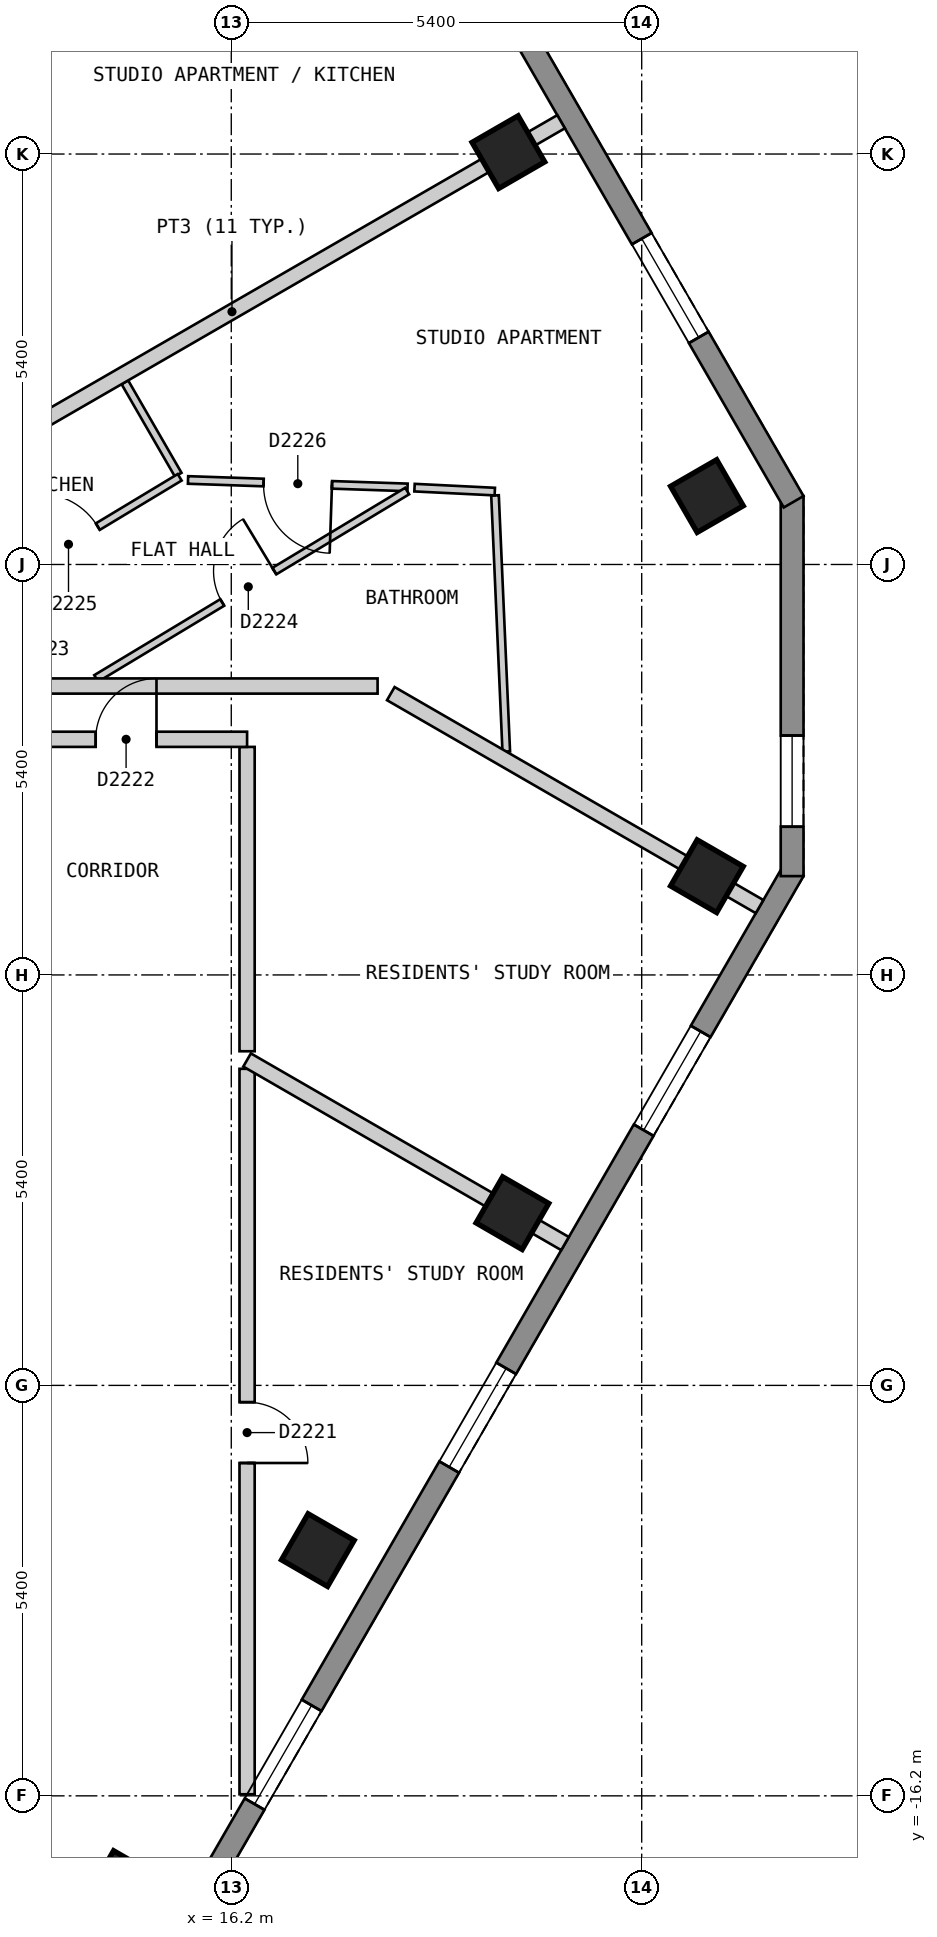
"""IFC4 building model, lengths in metres.
Left out: names, types, materials, properties, quantities, classifications, styles, units other than length and angle.
Written with IfcOpenShell. Run it as: python <this file> out.ifc"""

import sys

from ifc_helpers import new_model, si_unit, direction, frame, frame_2d, origin, origin_2d, place, context, subcontext, project, spatial, polyline, rectangle, outline, extrude, element, fill, save


model = new_model("IFC4")
c1 = context("Model", 3, precision=1e-05, world=origin(), true_north=direction((0.0, 1.0)))
c2 = subcontext(c1, "Body", "Model", "MODEL_VIEW")
j1 = project(units=[si_unit("LENGTHUNIT", "METRE"), si_unit("PLANEANGLEUNIT", "RADIAN")], contexts=[c1])
p1 = place(None, origin())
s1 = spatial("IfcSite", under=j1, at=p1, CompositionType="ELEMENT")
p2 = place(p1, origin())
s2 = spatial("IfcBuilding", under=s1, at=p2, CompositionType="ELEMENT")
p3 = place(p2, frame((0.0, 0.0, 235.8)))
s3 = spatial("IfcBuildingStorey", under=s2, at=p3, CompositionType="ELEMENT", Elevation=235.8)
for number, where, z_axis, x_axis in (
    (1, (14.78, -17.4, 0.0), (0.0, 0.0, 1.0), (0.5, 0.866, 0.0)),
    (2, (17.339, -12.967, 0.0), (0.0, 0.0, 1.0), (0.5, 0.866, 0.0)),
    (3, (19.899, -8.534, 0.0), (0.0, 0.0, 1.0), (0.5, 0.866, 0.0)),
    (4, (22.458, -4.101, 0.0), (0.0, 0.0, 1.0), (0.5, 0.866, 0.0)),
    (5, (22.458, 0.9, 0.0), (0.0, 0.0, 1.0), (-0.5, 0.866, 0.0)),
    (6, (19.846, 5.425, 0.0), (0.0, 0.0, 1.0), (-0.5, 0.866, 0.0)),
):
    element("IfcColumn", number, at=place(p3, frame(where, z_axis=z_axis, x_axis=x_axis)), inside=s3, PredefinedType="COLUMN", context=c2, shape_type="SweptSolid", body=[
        extrude(rectangle(XDim=0.7, YDim=0.7, at=origin_2d()), origin(), (0.0, 0.0, 1.0), 3.0),
    ])
p4 = place(p3, frame((15.285, -18.425, 0.0), z_axis=(0.0, 0.0, 1.0), x_axis=(0.500012653391, 0.866018098222, 0.0)))
e7 = element("IfcWall", 7, at=p4, inside=s3, PredefinedType="SOLIDWALL", context=c2, shape_type="SweptSolid", body=[
    extrude(outline(polyline([(0.0, -0.15), (16.628, -0.15), (16.548, 0.15), (0.08, 0.15), (0.0, -0.15)])), origin(), (0.0, 0.0, 1.0), 2.7),
])
p5 = place(p4, frame((2.444, 0.0, 0.15)))
e8 = element("IfcOpeningElement", 8, at=p5, cuts=e7, PredefinedType="OPENING", context=c2, shape_type="SweptSolid", body=[
    extrude(rectangle(XDim=1.5, YDim=2.1, at=frame_2d((0.75, 1.05))), frame((0.0, 0.16, 0.0), z_axis=(0.0, -1.0, 0.0), x_axis=(1.0, 0.0, 0.0)), (0.0, 0.0, 1.0), 0.32),
])
p6 = place(p4, frame((7.564, 0.0, 0.15)))
e9 = element("IfcOpeningElement", 9, at=p6, cuts=e7, PredefinedType="OPENING", context=c2, shape_type="SweptSolid", body=[
    extrude(rectangle(XDim=1.5, YDim=2.1, at=frame_2d((0.75, 1.05))), frame((0.0, 0.16, 0.0), z_axis=(0.0, -1.0, 0.0), x_axis=(1.0, 0.0, 0.0)), (0.0, 0.0, 1.0), 0.32),
])
p7 = place(p4, frame((12.682, 0.0, 0.15)))
e10 = element("IfcOpeningElement", 10, at=p7, cuts=e7, PredefinedType="OPENING", context=c2, shape_type="SweptSolid", body=[
    extrude(rectangle(XDim=1.5, YDim=2.1, at=frame_2d((0.75, 1.05))), frame((0.0, 0.16, 0.0), z_axis=(0.0, -1.0, 0.0), x_axis=(1.0, 0.0, 0.0)), (0.0, 0.0, 1.0), 0.32),
])
p8 = place(p3, frame((23.579, -4.1, 0.0), z_axis=(0.0, 0.0, 1.0), x_axis=(0.0, 1.0, 0.0)))
e11 = element("IfcWall", 11, at=p8, inside=s3, PredefinedType="SOLIDWALL", context=c2, shape_type="SweptSolid", body=[
    extrude(outline(polyline([(0.0, -0.15), (5.0, -0.15), (4.92, 0.15), (0.08, 0.15), (0.0, -0.15)])), origin(), (0.0, 0.0, 1.0), 2.7),
])
p9 = place(p8, frame((0.65, 0.0, 0.15)))
e12 = element("IfcOpeningElement", 12, at=p9, cuts=e11, PredefinedType="OPENING", context=c2, shape_type="SweptSolid", body=[
    extrude(rectangle(XDim=1.2, YDim=2.1, at=frame_2d((0.6, 1.05))), frame((0.0, 0.16, 0.0), z_axis=(0.0, -1.0, 0.0), x_axis=(1.0, 0.0, 0.0)), (0.0, 0.0, 1.0), 0.32),
])
p10 = place(p3, frame((23.599, 0.825, 0.0), z_axis=(0.0, 0.0, 1.0), x_axis=(-0.500003656944, 0.866023292436, 0.0)))
e13 = element("IfcWall", 13, at=p10, inside=s3, PredefinedType="SOLIDWALL", context=c2, shape_type="SweptSolid", body=[
    extrude(outline(polyline([(0.0, -0.15), (22.17, -0.15), (22.09, 0.15), (0.08, 0.15), (0.0, -0.15)])), origin(), (0.0, 0.0, 1.0), 2.7),
])
p11 = place(p10, frame((2.497, 0.0, 0.15)))
e14 = element("IfcOpeningElement", 14, at=p11, cuts=e13, PredefinedType="OPENING", context=c2, shape_type="SweptSolid", body=[
    extrude(rectangle(XDim=1.5, YDim=2.1, at=frame_2d((0.75, 1.05))), frame((0.0, 0.16, 0.0), z_axis=(0.0, -1.0, 0.0), x_axis=(1.0, 0.0, 0.0)), (0.0, 0.0, 1.0), 0.32),
])
p12 = place(p10, frame((7.723, 0.0, 0.15)))
e15 = element("IfcOpeningElement", 15, at=p12, cuts=e13, PredefinedType="OPENING", context=c2, shape_type="SweptSolid", body=[
    extrude(rectangle(XDim=1.5, YDim=2.1, at=frame_2d((0.75, 1.05))), frame((0.0, 0.16, 0.0), z_axis=(0.0, -1.0, 0.0), x_axis=(1.0, 0.0, 0.0)), (0.0, 0.0, 1.0), 0.32),
])
p13 = place(p10, frame((12.948, 0.0, 0.15)))
e16 = element("IfcOpeningElement", 16, at=p13, cuts=e13, PredefinedType="OPENING", context=c2, shape_type="SweptSolid", body=[
    extrude(rectangle(XDim=1.5, YDim=2.1, at=frame_2d((0.75, 1.05))), frame((0.0, 0.16, 0.0), z_axis=(0.0, -1.0, 0.0), x_axis=(1.0, 0.0, 0.0)), (0.0, 0.0, 1.0), 0.32),
])
p14 = place(p10, frame((18.173, 0.0, 0.15)))
e17 = element("IfcOpeningElement", 17, at=p14, cuts=e13, PredefinedType="OPENING", context=c2, shape_type="SweptSolid", body=[
    extrude(rectangle(XDim=1.5, YDim=2.1, at=frame_2d((0.75, 1.05))), frame((0.0, 0.16, 0.0), z_axis=(0.0, -1.0, 0.0), x_axis=(1.0, 0.0, 0.0)), (0.0, 0.0, 1.0), 0.32),
])
p15 = place(p3, frame((16.408, -2.4, 0.0), z_axis=(0.0, 0.0, 1.0), x_axis=(0.0, -1.0, 0.0)))
e18 = element("IfcWall", 18, at=p15, inside=s3, PredefinedType="PARTITIONING", context=c2, shape_type="SweptSolid", body=[
    extrude(rectangle(XDim=4.004, YDim=0.2, at=frame_2d((2.002, 0.0))), origin(), (0.0, 0.0, 1.0), 2.7),
])
p16 = place(p3, frame((13.474, -2.3, 0.0), z_axis=(0.0, 0.0, 1.0), x_axis=(1.0, 0.0, 0.0)))
e19 = element("IfcWall", 19, at=p16, inside=s3, PredefinedType="PARTITIONING", context=c2, shape_type="SweptSolid", body=[
    extrude(rectangle(XDim=2.934, YDim=0.2, at=frame_2d((1.467, 0.0))), origin(), (0.0, 0.0, 1.0), 2.7),
])
p17 = place(p16, frame((0.942, 0.0, 0.0)))
e20 = element("IfcOpeningElement", 20, at=p17, cuts=e19, PredefinedType="OPENING", context=c2, shape_type="SweptSolid", body=[
    extrude(rectangle(XDim=0.8, YDim=2.1, at=frame_2d((0.4, 1.05))), frame((0.0, 0.11, 0.0), z_axis=(0.0, -1.0, 0.0), x_axis=(1.0, 0.0, 0.0)), (0.0, 0.0, 1.0), 0.22),
])
p18 = place(p3, frame((16.408, -16.179, 0.0), z_axis=(0.0, 0.0, 1.0), x_axis=(0.0, 1.0, 0.0)))
e21 = element("IfcWall", 21, at=p18, inside=s3, PredefinedType="PARTITIONING", context=c2, shape_type="SweptSolid", body=[
    extrude(rectangle(XDim=9.544, YDim=0.2, at=frame_2d((4.772, 0.0))), origin(), (0.0, 0.0, 1.0), 2.7),
])
p19 = place(p18, frame((4.358, 0.0, 0.0)))
e22 = element("IfcOpeningElement", 22, at=p19, cuts=e21, PredefinedType="OPENING", context=c2, shape_type="SweptSolid", body=[
    extrude(rectangle(XDim=0.8, YDim=2.1, at=frame_2d((0.4, 1.05))), frame((0.0, 0.11, 0.0), z_axis=(0.0, -1.0, 0.0), x_axis=(1.0, 0.0, 0.0)), (0.0, 0.0, 1.0), 0.22),
])
p20 = place(p3, frame((14.8, 2.397, 0.0), z_axis=(0.0, 0.0, 1.0), x_axis=(0.49989805765, -0.866084252228, 0.0)))
e23 = element("IfcWall", 23, at=p20, inside=s3, PredefinedType="PARTITIONING", context=c2, shape_type="SweptSolid", body=[
    extrude(rectangle(XDim=1.404, YDim=0.1, at=frame_2d((0.702, 0.0))), origin(), (0.0, 0.0, 1.0), 2.7),
])
p21 = place(p3, frame((19.67, 0.909, 0.0), z_axis=(0.0, 0.0, 1.0), x_axis=(0.043933486644, -0.99903445824, 0.0)))
e24 = element("IfcWall", 24, at=p21, inside=s3, PredefinedType="PARTITIONING", context=c2, shape_type="SweptSolid", body=[
    extrude(rectangle(XDim=3.373, YDim=0.1, at=frame_2d((1.687, 0.0))), origin(), (0.0, 0.0, 1.0), 2.7),
])
p22 = place(p3, frame((15.631, 1.112, 0.0), z_axis=(0.0, 0.0, 1.0), x_axis=(0.999423034213, -0.033964668168, 0.0)))
e25 = element("IfcWall", 25, at=p22, inside=s3, PredefinedType="PARTITIONING", context=c2, shape_type="SweptSolid", body=[
    extrude(rectangle(XDim=2.89, YDim=0.1, at=frame_2d((1.445, 0.0))), origin(), (0.0, 0.0, 1.0), 2.7),
])
p23 = place(p22, frame((0.995, 0.0, 0.0)))
e26 = element("IfcOpeningElement", 26, at=p23, cuts=e25, PredefinedType="OPENING", context=c2, shape_type="SweptSolid", body=[
    extrude(rectangle(XDim=0.9, YDim=2.1, at=frame_2d((0.45, 1.05))), frame((0.0, 0.06, 0.0), z_axis=(0.0, -1.0, 0.0), x_axis=(1.0, 0.0, 0.0)), (0.0, 0.0, 1.0), 0.12),
])
p24 = place(p3, frame((12.681, -0.564, 0.0), z_axis=(0.0, 0.0, 1.0), x_axis=(0.856575482301, 0.516021746752, 0.0)))
e27 = element("IfcWall", 27, at=p24, inside=s3, PredefinedType="PARTITIONING", context=c2, shape_type="SweptSolid", body=[
    extrude(rectangle(XDim=3.316, YDim=0.1, at=frame_2d((1.658, 0.0))), origin(), (0.0, 0.0, 1.0), 2.7),
])
p25 = place(p24, frame((1.158, 0.0, 0.0)))
e28 = element("IfcOpeningElement", 28, at=p25, cuts=e27, PredefinedType="OPENING", context=c2, shape_type="SweptSolid", body=[
    extrude(rectangle(XDim=0.9, YDim=2.1, at=frame_2d((0.45, 1.05))), frame((0.0, 0.06, 0.0), z_axis=(0.0, -1.0, 0.0), x_axis=(1.0, 0.0, 0.0)), (0.0, 0.0, 1.0), 0.12),
])
p26 = place(p3, frame((14.423, -1.499, 0.0), z_axis=(0.0, 0.0, 1.0), x_axis=(0.856512638305, 0.516126050905, 0.0)))
e29 = element("IfcWall", 29, at=p26, inside=s3, PredefinedType="PARTITIONING", context=c2, shape_type="SweptSolid", body=[
    extrude(rectangle(XDim=4.776, YDim=0.1, at=frame_2d((2.388, 0.0))), origin(), (0.0, 0.0, 1.0), 2.7),
])
p27 = place(p26, frame((1.936, 0.0, 0.0)))
e30 = element("IfcOpeningElement", 30, at=p27, cuts=e29, PredefinedType="OPENING", context=c2, shape_type="SweptSolid", body=[
    extrude(rectangle(XDim=0.8, YDim=2.1, at=frame_2d((0.4, 1.05))), frame((0.0, 0.06, 0.0), z_axis=(0.0, -1.0, 0.0), x_axis=(1.0, 0.0, 0.0)), (0.0, 0.0, 1.0), 0.12),
])
p28 = place(p3, frame((18.299, -1.699, 0.0), z_axis=(0.0, 0.0, 1.0), x_axis=(0.865962789554, -0.50010843535, 0.0)))
e31 = element("IfcWall", 31, at=p28, inside=s3, PredefinedType="PARTITIONING", context=c2, shape_type="SweptSolid", body=[
    extrude(rectangle(XDim=5.603, YDim=0.2, at=frame_2d((2.801, 0.0))), origin(), (0.0, 0.0, 1.0), 2.7),
])
p29 = place(p3, frame((16.408, -6.519, 0.0), z_axis=(0.0, 0.0, 1.0), x_axis=(0.866032396701, -0.499987887718, 0.0)))
e32 = element("IfcWall", 32, at=p29, inside=s3, PredefinedType="PARTITIONING", context=c2, shape_type="SweptSolid", body=[
    extrude(rectangle(XDim=4.83, YDim=0.2, at=frame_2d((2.415, 0.0))), origin(), (0.0, 0.0, 1.0), 2.7),
])
p30 = place(p3, frame((13.163, -1.599, 0.0), z_axis=(0.0, 0.0, 1.0), x_axis=(1.0, 0.0, 0.0)))
e33 = element("IfcWall", 33, at=p30, inside=s3, PredefinedType="PARTITIONING", context=c2, shape_type="SweptSolid", body=[
    extrude(rectangle(XDim=4.962, YDim=0.2, at=frame_2d((2.481, 0.0))), origin(), (0.0, 0.0, 1.0), 2.7),
])
p31 = place(p3, frame((11.879, 0.826, 0.0), z_axis=(0.0, 0.0, 1.0), x_axis=(0.866065245018, 0.499930986609, 0.0)))
e34 = element("IfcWall", 34, at=p31, inside=s3, PredefinedType="PARTITIONING", context=c2, shape_type="SweptSolid", body=[
    extrude(rectangle(XDim=10.0, YDim=0.2, at=frame_2d((5.0, 0.0))), origin(), (0.0, 0.0, 1.0), 2.7),
])
p32 = place(p3, frame((9.457, 5.461, 0.0), z_axis=(0.0, 0.0, 1.0), x_axis=(0.866043818878, 0.499968102766, 0.0)))
e35 = element("IfcWall", 35, at=p32, inside=s3, PredefinedType="PARTITIONING", context=c2, shape_type="SweptSolid", body=[
    extrude(rectangle(XDim=9.779, YDim=0.2, at=frame_2d((4.89, 0.0))), origin(), (0.0, 0.0, 1.0), 2.7),
])
p33 = place(p3, frame((18.611, 1.011, 0.0), z_axis=(0.0, 0.0, 1.0), x_axis=(0.998789491469, -0.049188939117, 0.0)))
e36 = element("IfcWall", 36, at=p33, inside=s3, PredefinedType="PARTITIONING", context=c2, shape_type="SweptSolid", body=[
    extrude(rectangle(XDim=1.057, YDim=0.1, at=frame_2d((0.529, 0.0))), origin(), (0.0, 0.0, 1.0), 2.7),
])
p34 = place(p5, origin())
e37 = element("IfcWindow", 37, at=p34, inside=s3, PartitioningType="SINGLE_PANEL", PredefinedType="WINDOW", context=c2, shape_type="SweptSolid", body=[
    extrude(rectangle(XDim=1.5, YDim=2.1, at=frame_2d((0.75, 1.05))), frame((0.0, 0.03, 0.0), z_axis=(0.0, -1.0, 0.0), x_axis=(1.0, 0.0, 0.0)), (0.0, 0.0, 1.0), 0.06),
])
fill(e8, e37)
p35 = place(p6, origin())
e38 = element("IfcWindow", 38, at=p35, inside=s3, PartitioningType="SINGLE_PANEL", PredefinedType="WINDOW", context=c2, shape_type="SweptSolid", body=[
    extrude(rectangle(XDim=1.5, YDim=2.1, at=frame_2d((0.75, 1.05))), frame((0.0, 0.03, 0.0), z_axis=(0.0, -1.0, 0.0), x_axis=(1.0, 0.0, 0.0)), (0.0, 0.0, 1.0), 0.06),
])
fill(e9, e38)
p36 = place(p7, origin())
e39 = element("IfcWindow", 39, at=p36, inside=s3, PartitioningType="SINGLE_PANEL", PredefinedType="WINDOW", context=c2, shape_type="SweptSolid", body=[
    extrude(rectangle(XDim=1.5, YDim=2.1, at=frame_2d((0.75, 1.05))), frame((0.0, 0.03, 0.0), z_axis=(0.0, -1.0, 0.0), x_axis=(1.0, 0.0, 0.0)), (0.0, 0.0, 1.0), 0.06),
])
fill(e10, e39)
p37 = place(p9, origin())
e40 = element("IfcWindow", 40, at=p37, inside=s3, PartitioningType="SINGLE_PANEL", PredefinedType="WINDOW", context=c2, shape_type="SweptSolid", body=[
    extrude(rectangle(XDim=1.2, YDim=2.1, at=frame_2d((0.6, 1.05))), frame((0.0, 0.03, 0.0), z_axis=(0.0, -1.0, 0.0), x_axis=(1.0, 0.0, 0.0)), (0.0, 0.0, 1.0), 0.06),
])
fill(e12, e40)
p38 = place(p11, origin())
e41 = element("IfcWindow", 41, at=p38, inside=s3, PartitioningType="SINGLE_PANEL", PredefinedType="WINDOW", context=c2, shape_type="SweptSolid", body=[
    extrude(rectangle(XDim=1.5, YDim=2.1, at=frame_2d((0.75, 1.05))), frame((0.0, 0.03, 0.0), z_axis=(0.0, -1.0, 0.0), x_axis=(1.0, 0.0, 0.0)), (0.0, 0.0, 1.0), 0.06),
])
fill(e14, e41)
p39 = place(p19, origin())
e42 = element("IfcDoor", 42, at=p39, inside=s3, OperationType="SINGLE_SWING_LEFT", PredefinedType="DOOR", context=c2, shape_type="SweptSolid", body=[
    extrude(rectangle(XDim=0.8, YDim=2.1, at=frame_2d((0.4, 1.05))), frame((0.0, 0.025, 0.0), z_axis=(0.0, -1.0, 0.0), x_axis=(1.0, 0.0, 0.0)), (0.0, 0.0, 1.0), 0.05),
])
fill(e22, e42)
p40 = place(p17, origin())
e43 = element("IfcDoor", 43, at=p40, inside=s3, OperationType="SINGLE_SWING_RIGHT", PredefinedType="DOOR", context=c2, shape_type="SweptSolid", body=[
    extrude(rectangle(XDim=0.8, YDim=2.1, at=frame_2d((0.4, 1.05))), frame((0.0, 0.025, 0.0), z_axis=(0.0, -1.0, 0.0), x_axis=(1.0, 0.0, 0.0)), (0.0, 0.0, 1.0), 0.05),
])
fill(e20, e43)
p41 = place(p27, origin())
e44 = element("IfcDoor", 44, at=p41, inside=s3, OperationType="SINGLE_SWING_RIGHT", PredefinedType="DOOR", context=c2, shape_type="SweptSolid", body=[
    extrude(rectangle(XDim=0.8, YDim=2.1, at=frame_2d((0.4, 1.05))), frame((0.0, 0.025, 0.0), z_axis=(0.0, -1.0, 0.0), x_axis=(1.0, 0.0, 0.0)), (0.0, 0.0, 1.0), 0.05),
])
fill(e30, e44)
p42 = place(p25, origin())
e45 = element("IfcDoor", 45, at=p42, inside=s3, OperationType="SINGLE_SWING_LEFT", PredefinedType="DOOR", context=c2, shape_type="SweptSolid", body=[
    extrude(rectangle(XDim=0.9, YDim=2.1, at=frame_2d((0.45, 1.05))), frame((0.0, 0.025, 0.0), z_axis=(0.0, -1.0, 0.0), x_axis=(1.0, 0.0, 0.0)), (0.0, 0.0, 1.0), 0.05),
])
fill(e28, e45)
p43 = place(p23, origin())
e46 = element("IfcDoor", 46, at=p43, inside=s3, OperationType="SINGLE_SWING_RIGHT", PredefinedType="DOOR", context=c2, shape_type="SweptSolid", body=[
    extrude(rectangle(XDim=0.9, YDim=2.1, at=frame_2d((0.45, 1.05))), frame((0.0, 0.025, 0.0), z_axis=(0.0, -1.0, 0.0), x_axis=(1.0, 0.0, 0.0)), (0.0, 0.0, 1.0), 0.05),
])
fill(e26, e46)
save(model, sys.argv[1])
